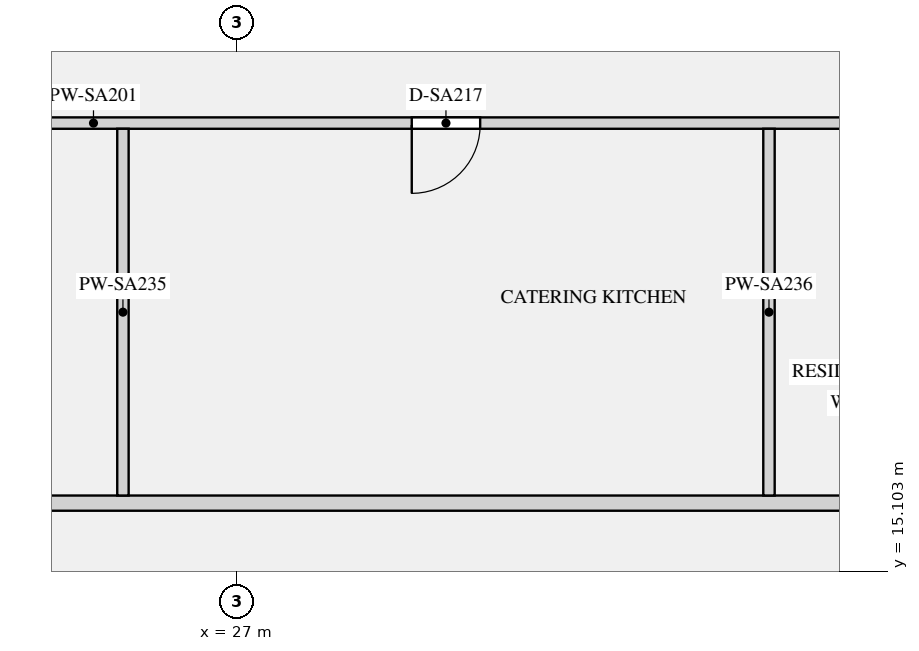
"""IFC4 building model, lengths in metres.
Left out: names, types, materials, properties, quantities, classifications, styles, units other than length and angle.
Written with IfcOpenShell. Run it as: python <this file> out.ifc"""

import sys

from ifc_helpers import new_model, si_unit, direction, frame, frame_2d, origin, place, context, subcontext, project, spatial, rectangle, extrude, element, fill, save


model = new_model("IFC4")
c1 = context("Model", 3, precision=1e-05, world=origin(), true_north=direction((0.0, 1.0)))
c2 = subcontext(c1, "Body", "Model", "MODEL_VIEW")
j1 = project(units=[si_unit("LENGTHUNIT", "METRE"), si_unit("PLANEANGLEUNIT", "RADIAN")], contexts=[c1])
p1 = place(None, origin())
s1 = spatial("IfcSite", under=j1, at=p1, CompositionType="ELEMENT")
p2 = place(p1, origin())
s2 = spatial("IfcBuilding", under=s1, at=p2, CompositionType="ELEMENT")
p3 = place(p2, frame((0.0, 0.0, 191.7)))
s3 = spatial("IfcBuildingStorey", under=s2, at=p3, CompositionType="ELEMENT", Elevation=191.7)
p4 = place(p3, frame((20.925, 21.0, 0.0), z_axis=(0.0, 0.0, 1.0), x_axis=(1.0, 0.0, 0.0)))
e1 = element("IfcWall", 1, at=p4, inside=s3, PredefinedType="PARTITIONING", context=c2, shape_type="SweptSolid", body=[
    extrude(rectangle(XDim=30.15, YDim=0.15, at=frame_2d((15.075, 0.0))), origin(), (0.0, 0.0, 1.0), 5.98),
])
p5 = place(p4, frame((8.375, 0.0, 0.0)))
e2 = element("IfcOpeningElement", 2, at=p5, cuts=e1, PredefinedType="OPENING", context=c2, shape_type="SweptSolid", body=[
    extrude(rectangle(XDim=0.9, YDim=2.1, at=frame_2d((0.45, 1.05))), frame((0.0, 0.085, 0.0), z_axis=(0.0, -1.0, 0.0), x_axis=(1.0, 0.0, 0.0)), (0.0, 0.0, 1.0), 0.17),
])
p6 = place(p4, frame((14.625, 0.0, 0.0)))
e3 = element("IfcOpeningElement", 3, at=p6, cuts=e1, PredefinedType="OPENING", context=c2, shape_type="SweptSolid", body=[
    extrude(rectangle(XDim=0.9, YDim=2.1, at=frame_2d((0.45, 1.05))), frame((0.0, 0.085, 0.0), z_axis=(0.0, -1.0, 0.0), x_axis=(1.0, 0.0, 0.0)), (0.0, 0.0, 1.0), 0.17),
])
p7 = place(p4, frame((19.375, 0.0, 0.0)))
e4 = element("IfcOpeningElement", 4, at=p7, cuts=e1, PredefinedType="OPENING", context=c2, shape_type="SweptSolid", body=[
    extrude(rectangle(XDim=0.9, YDim=2.1, at=frame_2d((0.45, 1.05))), frame((0.0, 0.085, 0.0), z_axis=(0.0, -1.0, 0.0), x_axis=(1.0, 0.0, 0.0)), (0.0, 0.0, 1.0), 0.17),
])
p8 = place(p4, frame((25.875, 0.0, 0.0)))
e5 = element("IfcOpeningElement", 5, at=p8, cuts=e1, PredefinedType="OPENING", context=c2, shape_type="SweptSolid", body=[
    extrude(rectangle(XDim=0.9, YDim=2.1, at=frame_2d((0.45, 1.05))), frame((0.0, 0.085, 0.0), z_axis=(0.0, -1.0, 0.0), x_axis=(1.0, 0.0, 0.0)), (0.0, 0.0, 1.0), 0.17),
])
p9 = place(p3, frame((17.925, 16.0, 0.0), z_axis=(0.0, 0.0, 1.0), x_axis=(1.0, 0.0, 0.0)))
e6 = element("IfcWall", 6, at=p9, inside=s3, PredefinedType="PARTITIONING", context=c2, shape_type="SweptSolid", body=[
    extrude(rectangle(XDim=36.15, YDim=0.2, at=frame_2d((18.075, 0.0))), origin(), (0.0, 0.0, 1.0), 5.98),
])
p10 = place(p9, frame((0.875, 0.0, 0.0)))
e7 = element("IfcOpeningElement", 7, at=p10, cuts=e6, PredefinedType="OPENING", context=c2, shape_type="SweptSolid", body=[
    extrude(rectangle(XDim=1.4, YDim=2.1, at=frame_2d((0.7, 1.05))), frame((0.0, 0.11, 0.0), z_axis=(0.0, -1.0, 0.0), x_axis=(1.0, 0.0, 0.0)), (0.0, 0.0, 1.0), 0.22),
])
p11 = place(p9, frame((33.875, 0.0, 0.0)))
e8 = element("IfcOpeningElement", 8, at=p11, cuts=e6, PredefinedType="OPENING", context=c2, shape_type="SweptSolid", body=[
    extrude(rectangle(XDim=1.4, YDim=2.1, at=frame_2d((0.7, 1.05))), frame((0.0, 0.11, 0.0), z_axis=(0.0, -1.0, 0.0), x_axis=(1.0, 0.0, 0.0)), (0.0, 0.0, 1.0), 0.22),
])
for number, where, z_axis, x_axis in (
    (9, (25.5, 16.1, 0.0), (0.0, 0.0, 1.0), (0.0, 1.0, 0.0)),
    (10, (34.0, 16.1, 0.0), (0.0, 0.0, 1.0), (0.0, 1.0, 0.0)),
):
    element("IfcWall", number, at=place(p3, frame(where, z_axis=z_axis, x_axis=x_axis)), inside=s3, PredefinedType="PARTITIONING", context=c2, shape_type="SweptSolid", body=[
        extrude(rectangle(XDim=4.825, YDim=0.15, at=frame_2d((2.413, 0.0))), origin(), (0.0, 0.0, 1.0), 5.98),
    ])
p12 = place(p5, frame((0.9, 0.0, 0.0), z_axis=(0.0, 0.0, 1.0), x_axis=(-1.0, 0.0, 0.0)))
e11 = element("IfcDoor", 11, at=p12, inside=s3, OperationType="SINGLE_SWING_RIGHT", PredefinedType="DOOR", context=c2, shape_type="SweptSolid", body=[
    extrude(rectangle(XDim=0.9, YDim=2.1, at=frame_2d((0.45, 1.05))), frame((0.0, 0.025, 0.0), z_axis=(0.0, -1.0, 0.0), x_axis=(1.0, 0.0, 0.0)), (0.0, 0.0, 1.0), 0.05),
])
fill(e2, e11)
save(model, sys.argv[1])
